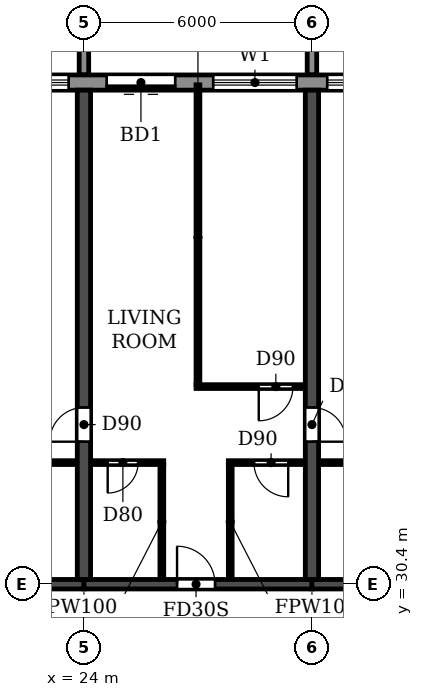
"""IFC4 building model, lengths in metres.
Left out: names, types, materials, properties, quantities, classifications, styles, units other than length and angle.
Written with IfcOpenShell. Run it as: python <this file> out.ifc"""

import sys

from ifc_helpers import new_model, si_unit, direction, frame, frame_2d, origin, place, context, subcontext, project, spatial, polyline, rectangle, outline, extrude, source, transform, mapped, element, fill, save


model = new_model("IFC4")
c1 = context("Model", 3, precision=1e-05, world=origin(), true_north=direction((0.0, 1.0)))
c2 = subcontext(c1, "Body", "Model", "MODEL_VIEW")
j1 = project(units=[si_unit("LENGTHUNIT", "METRE"), si_unit("PLANEANGLEUNIT", "RADIAN")], contexts=[c1])
p1 = place(None, origin())
s1 = spatial("IfcSite", under=j1, at=p1, CompositionType="ELEMENT")
p2 = place(p1, origin())
s2 = spatial("IfcBuilding", under=s1, at=p2, CompositionType="ELEMENT")
p3 = place(p2, frame((0.0, 0.0, 102.6)))
s3 = spatial("IfcBuildingStorey", under=s2, at=p3, CompositionType="ELEMENT", Elevation=102.6)
p4 = place(p3, frame((24.0, 30.525, 0.0), z_axis=(0.0, 0.0, 1.0), x_axis=(0.0, 1.0, 0.0)))
e1 = element("IfcWall", 1, at=p4, inside=s3, PredefinedType="SHEAR", context=c2, shape_type="SweptSolid", body=[
    extrude(rectangle(XDim=12.875, YDim=0.35, at=frame_2d((6.438, 0.0))), origin(), (0.0, 0.0, 1.0), 3.0),
])
p5 = place(p4, frame((3.625, 0.0, 0.0)))
e2 = element("IfcOpeningElement", 2, at=p5, cuts=e1, PredefinedType="OPENING", context=c2, shape_type="SweptSolid", body=[
    extrude(rectangle(XDim=0.9, YDim=2.1, at=frame_2d((0.45, 1.05))), frame((0.0, 0.185, 0.0), z_axis=(0.0, -1.0, 0.0), x_axis=(1.0, 0.0, 0.0)), (0.0, 0.0, 1.0), 0.37),
])
p6 = place(p3, frame((30.0, 30.525, 0.0), z_axis=(0.0, 0.0, 1.0), x_axis=(0.0, 1.0, 0.0)))
e3 = element("IfcWall", 3, at=p6, inside=s3, PredefinedType="SHEAR", context=c2, shape_type="SweptSolid", body=[
    extrude(rectangle(XDim=12.875, YDim=0.35, at=frame_2d((6.438, 0.0))), origin(), (0.0, 0.0, 1.0), 3.0),
])
p7 = place(p6, frame((3.625, 0.0, 0.0)))
e4 = element("IfcOpeningElement", 4, at=p7, cuts=e3, PredefinedType="OPENING", context=c2, shape_type="SweptSolid", body=[
    extrude(rectangle(XDim=0.9, YDim=2.1, at=frame_2d((0.45, 1.05))), frame((0.0, 0.185, 0.0), z_axis=(0.0, -1.0, 0.0), x_axis=(1.0, 0.0, 0.0)), (0.0, 0.0, 1.0), 0.37),
])
p8 = place(p3, frame((18.0, 30.4, 0.0), z_axis=(0.0, 0.0, 1.0), x_axis=(1.0, 0.0, 0.0)))
e5 = element("IfcWall", 5, at=p8, inside=s3, PredefinedType="SHEAR", context=c2, shape_type="SweptSolid", body=[
    extrude(rectangle(XDim=6.0, YDim=0.25, at=frame_2d((3.0, 0.0))), origin(), (0.0, 0.0, 1.0), 2.4),
])
p9 = place(p3, frame((24.0, 30.4, 0.0), z_axis=(0.0, 0.0, 1.0), x_axis=(1.0, 0.0, 0.0)))
e6 = element("IfcWall", 6, at=p9, inside=s3, PredefinedType="SHEAR", context=c2, shape_type="SweptSolid", body=[
    extrude(rectangle(XDim=6.0, YDim=0.25, at=frame_2d((3.0, 0.0))), origin(), (0.0, 0.0, 1.0), 2.4),
])
p10 = place(p9, frame((2.45, 0.0, 0.0)))
e7 = element("IfcOpeningElement", 7, at=p10, cuts=e6, PredefinedType="OPENING", context=c2, shape_type="SweptSolid", body=[
    extrude(rectangle(XDim=1.0, YDim=2.1, at=frame_2d((0.5, 1.05))), frame((0.0, 0.135, 0.0), z_axis=(0.0, -1.0, 0.0), x_axis=(1.0, 0.0, 0.0)), (0.0, 0.0, 1.0), 0.27),
])
p11 = place(p3, frame((30.0, 30.4, 0.0), z_axis=(0.0, 0.0, 1.0), x_axis=(1.0, 0.0, 0.0)))
e8 = element("IfcWall", 8, at=p11, inside=s3, PredefinedType="SHEAR", context=c2, shape_type="SweptSolid", body=[
    extrude(rectangle(XDim=6.0, YDim=0.25, at=frame_2d((3.0, 0.0))), origin(), (0.0, 0.0, 1.0), 2.4),
])
p12 = place(p3, frame((91.317, 43.6, 0.0), z_axis=(0.0, 0.0, 1.0), x_axis=(-1.0, 0.0, 0.0)))
e9 = element("IfcWall", 9, at=p12, inside=s3, PredefinedType="STANDARD", context=c2, shape_type="SweptSolid", body=[
    extrude(rectangle(XDim=80.634, YDim=0.4, at=frame_2d((40.317, 0.0))), origin(), (0.0, 0.0, 1.0), 3.0),
])
p13 = place(p12, frame((76.717, 0.0, 0.9)))
e10 = element("IfcOpeningElement", 10, at=p13, cuts=e9, PredefinedType="OPENING", context=c2, shape_type="SweptSolid", body=[
    extrude(rectangle(XDim=2.2, YDim=1.5, at=frame_2d((1.1, 0.75))), frame((0.0, 0.21, 0.0), z_axis=(0.0, -1.0, 0.0), x_axis=(1.0, 0.0, 0.0)), (0.0, 0.0, 1.0), 0.42),
])
p14 = place(p12, frame((73.917, 0.0, 0.0)))
e11 = element("IfcOpeningElement", 11, at=p14, cuts=e9, PredefinedType="OPENING", context=c2, shape_type="SweptSolid", body=[
    extrude(rectangle(XDim=1.8, YDim=2.4, at=frame_2d((0.9, 1.2))), frame((0.0, 0.21, 0.0), z_axis=(0.0, -1.0, 0.0), x_axis=(1.0, 0.0, 0.0)), (0.0, 0.0, 1.0), 0.42),
])
p15 = place(p12, frame((70.717, 0.0, 0.9)))
e12 = element("IfcOpeningElement", 12, at=p15, cuts=e9, PredefinedType="OPENING", context=c2, shape_type="SweptSolid", body=[
    extrude(rectangle(XDim=2.2, YDim=1.5, at=frame_2d((1.1, 0.75))), frame((0.0, 0.21, 0.0), z_axis=(0.0, -1.0, 0.0), x_axis=(1.0, 0.0, 0.0)), (0.0, 0.0, 1.0), 0.42),
])
p16 = place(p12, frame((67.717, 0.0, 0.9)))
e13 = element("IfcOpeningElement", 13, at=p16, cuts=e9, PredefinedType="OPENING", context=c2, shape_type="SweptSolid", body=[
    extrude(rectangle(XDim=2.2, YDim=1.5, at=frame_2d((1.1, 0.75))), frame((0.0, 0.21, 0.0), z_axis=(0.0, -1.0, 0.0), x_axis=(1.0, 0.0, 0.0)), (0.0, 0.0, 1.0), 0.42),
])
p17 = place(p12, frame((64.917, 0.0, 0.0)))
e14 = element("IfcOpeningElement", 14, at=p17, cuts=e9, PredefinedType="OPENING", context=c2, shape_type="SweptSolid", body=[
    extrude(rectangle(XDim=1.8, YDim=2.4, at=frame_2d((0.9, 1.2))), frame((0.0, 0.21, 0.0), z_axis=(0.0, -1.0, 0.0), x_axis=(1.0, 0.0, 0.0)), (0.0, 0.0, 1.0), 0.42),
])
p18 = place(p12, frame((61.717, 0.0, 0.9)))
e15 = element("IfcOpeningElement", 15, at=p18, cuts=e9, PredefinedType="OPENING", context=c2, shape_type="SweptSolid", body=[
    extrude(rectangle(XDim=2.2, YDim=1.5, at=frame_2d((1.1, 0.75))), frame((0.0, 0.21, 0.0), z_axis=(0.0, -1.0, 0.0), x_axis=(1.0, 0.0, 0.0)), (0.0, 0.0, 1.0), 0.42),
])
p19 = place(p12, frame((58.717, 0.0, 0.9)))
e16 = element("IfcOpeningElement", 16, at=p19, cuts=e9, PredefinedType="OPENING", context=c2, shape_type="SweptSolid", body=[
    extrude(rectangle(XDim=2.2, YDim=1.5, at=frame_2d((1.1, 0.75))), frame((0.0, 0.21, 0.0), z_axis=(0.0, -1.0, 0.0), x_axis=(1.0, 0.0, 0.0)), (0.0, 0.0, 1.0), 0.42),
])
p20 = place(p12, frame((55.717, 0.0, 0.9)))
e17 = element("IfcOpeningElement", 17, at=p20, cuts=e9, PredefinedType="OPENING", context=c2, shape_type="SweptSolid", body=[
    extrude(rectangle(XDim=2.2, YDim=1.5, at=frame_2d((1.1, 0.75))), frame((0.0, 0.21, 0.0), z_axis=(0.0, -1.0, 0.0), x_axis=(1.0, 0.0, 0.0)), (0.0, 0.0, 1.0), 0.42),
])
p21 = place(p12, frame((52.717, 0.0, 0.9)))
e18 = element("IfcOpeningElement", 18, at=p21, cuts=e9, PredefinedType="OPENING", context=c2, shape_type="SweptSolid", body=[
    extrude(rectangle(XDim=2.2, YDim=1.5, at=frame_2d((1.1, 0.75))), frame((0.0, 0.21, 0.0), z_axis=(0.0, -1.0, 0.0), x_axis=(1.0, 0.0, 0.0)), (0.0, 0.0, 1.0), 0.42),
])
p22 = place(p12, frame((49.917, 0.0, 0.0)))
e19 = element("IfcOpeningElement", 19, at=p22, cuts=e9, PredefinedType="OPENING", context=c2, shape_type="SweptSolid", body=[
    extrude(rectangle(XDim=1.8, YDim=2.4, at=frame_2d((0.9, 1.2))), frame((0.0, 0.21, 0.0), z_axis=(0.0, -1.0, 0.0), x_axis=(1.0, 0.0, 0.0)), (0.0, 0.0, 1.0), 0.42),
])
p23 = place(p12, frame((46.717, 0.0, 0.9)))
e20 = element("IfcOpeningElement", 20, at=p23, cuts=e9, PredefinedType="OPENING", context=c2, shape_type="SweptSolid", body=[
    extrude(rectangle(XDim=2.2, YDim=1.5, at=frame_2d((1.1, 0.75))), frame((0.0, 0.21, 0.0), z_axis=(0.0, -1.0, 0.0), x_axis=(1.0, 0.0, 0.0)), (0.0, 0.0, 1.0), 0.42),
])
p24 = place(p12, frame((43.917, 0.0, 0.0)))
e21 = element("IfcOpeningElement", 21, at=p24, cuts=e9, PredefinedType="OPENING", context=c2, shape_type="SweptSolid", body=[
    extrude(rectangle(XDim=1.8, YDim=2.4, at=frame_2d((0.9, 1.2))), frame((0.0, 0.21, 0.0), z_axis=(0.0, -1.0, 0.0), x_axis=(1.0, 0.0, 0.0)), (0.0, 0.0, 1.0), 0.42),
])
p25 = place(p12, frame((40.717, 0.0, 0.9)))
e22 = element("IfcOpeningElement", 22, at=p25, cuts=e9, PredefinedType="OPENING", context=c2, shape_type="SweptSolid", body=[
    extrude(rectangle(XDim=2.2, YDim=1.5, at=frame_2d((1.1, 0.75))), frame((0.0, 0.21, 0.0), z_axis=(0.0, -1.0, 0.0), x_axis=(1.0, 0.0, 0.0)), (0.0, 0.0, 1.0), 0.42),
])
p26 = place(p12, frame((37.717, 0.0, 0.9)))
e23 = element("IfcOpeningElement", 23, at=p26, cuts=e9, PredefinedType="OPENING", context=c2, shape_type="SweptSolid", body=[
    extrude(rectangle(XDim=2.2, YDim=1.5, at=frame_2d((1.1, 0.75))), frame((0.0, 0.21, 0.0), z_axis=(0.0, -1.0, 0.0), x_axis=(1.0, 0.0, 0.0)), (0.0, 0.0, 1.0), 0.42),
])
p27 = place(p12, frame((34.917, 0.0, 0.0)))
e24 = element("IfcOpeningElement", 24, at=p27, cuts=e9, PredefinedType="OPENING", context=c2, shape_type="SweptSolid", body=[
    extrude(rectangle(XDim=1.8, YDim=2.4, at=frame_2d((0.9, 1.2))), frame((0.0, 0.21, 0.0), z_axis=(0.0, -1.0, 0.0), x_axis=(1.0, 0.0, 0.0)), (0.0, 0.0, 1.0), 0.42),
])
p28 = place(p12, frame((31.717, 0.0, 0.9)))
e25 = element("IfcOpeningElement", 25, at=p28, cuts=e9, PredefinedType="OPENING", context=c2, shape_type="SweptSolid", body=[
    extrude(rectangle(XDim=2.2, YDim=1.5, at=frame_2d((1.1, 0.75))), frame((0.0, 0.21, 0.0), z_axis=(0.0, -1.0, 0.0), x_axis=(1.0, 0.0, 0.0)), (0.0, 0.0, 1.0), 0.42),
])
p29 = place(p12, frame((28.717, 0.0, 0.9)))
e26 = element("IfcOpeningElement", 26, at=p29, cuts=e9, PredefinedType="OPENING", context=c2, shape_type="SweptSolid", body=[
    extrude(rectangle(XDim=2.2, YDim=1.5, at=frame_2d((1.1, 0.75))), frame((0.0, 0.21, 0.0), z_axis=(0.0, -1.0, 0.0), x_axis=(1.0, 0.0, 0.0)), (0.0, 0.0, 1.0), 0.42),
])
p30 = place(p12, frame((25.917, 0.0, 0.0)))
e27 = element("IfcOpeningElement", 27, at=p30, cuts=e9, PredefinedType="OPENING", context=c2, shape_type="SweptSolid", body=[
    extrude(rectangle(XDim=1.8, YDim=2.4, at=frame_2d((0.9, 1.2))), frame((0.0, 0.21, 0.0), z_axis=(0.0, -1.0, 0.0), x_axis=(1.0, 0.0, 0.0)), (0.0, 0.0, 1.0), 0.42),
])
p31 = place(p12, frame((22.717, 0.0, 0.9)))
e28 = element("IfcOpeningElement", 28, at=p31, cuts=e9, PredefinedType="OPENING", context=c2, shape_type="SweptSolid", body=[
    extrude(rectangle(XDim=2.2, YDim=1.5, at=frame_2d((1.1, 0.75))), frame((0.0, 0.21, 0.0), z_axis=(0.0, -1.0, 0.0), x_axis=(1.0, 0.0, 0.0)), (0.0, 0.0, 1.0), 0.42),
])
p32 = place(p12, frame((19.717, 0.0, 0.9)))
e29 = element("IfcOpeningElement", 29, at=p32, cuts=e9, PredefinedType="OPENING", context=c2, shape_type="SweptSolid", body=[
    extrude(rectangle(XDim=2.2, YDim=1.5, at=frame_2d((1.1, 0.75))), frame((0.0, 0.21, 0.0), z_axis=(0.0, -1.0, 0.0), x_axis=(1.0, 0.0, 0.0)), (0.0, 0.0, 1.0), 0.42),
])
p33 = place(p12, frame((16.917, 0.0, 0.0)))
e30 = element("IfcOpeningElement", 30, at=p33, cuts=e9, PredefinedType="OPENING", context=c2, shape_type="SweptSolid", body=[
    extrude(rectangle(XDim=1.8, YDim=2.4, at=frame_2d((0.9, 1.2))), frame((0.0, 0.21, 0.0), z_axis=(0.0, -1.0, 0.0), x_axis=(1.0, 0.0, 0.0)), (0.0, 0.0, 1.0), 0.42),
])
p34 = place(p12, frame((13.717, 0.0, 0.9)))
e31 = element("IfcOpeningElement", 31, at=p34, cuts=e9, PredefinedType="OPENING", context=c2, shape_type="SweptSolid", body=[
    extrude(rectangle(XDim=2.2, YDim=1.5, at=frame_2d((1.1, 0.75))), frame((0.0, 0.21, 0.0), z_axis=(0.0, -1.0, 0.0), x_axis=(1.0, 0.0, 0.0)), (0.0, 0.0, 1.0), 0.42),
])
p35 = place(p12, frame((10.917, 0.0, 0.0)))
e32 = element("IfcOpeningElement", 32, at=p35, cuts=e9, PredefinedType="OPENING", context=c2, shape_type="SweptSolid", body=[
    extrude(rectangle(XDim=1.8, YDim=2.4, at=frame_2d((0.9, 1.2))), frame((0.0, 0.21, 0.0), z_axis=(0.0, -1.0, 0.0), x_axis=(1.0, 0.0, 0.0)), (0.0, 0.0, 1.0), 0.42),
])
p36 = place(p12, frame((7.717, 0.0, 0.9)))
e33 = element("IfcOpeningElement", 33, at=p36, cuts=e9, PredefinedType="OPENING", context=c2, shape_type="SweptSolid", body=[
    extrude(rectangle(XDim=2.2, YDim=1.5, at=frame_2d((1.1, 0.75))), frame((0.0, 0.21, 0.0), z_axis=(0.0, -1.0, 0.0), x_axis=(1.0, 0.0, 0.0)), (0.0, 0.0, 1.0), 0.42),
])
p37 = place(p12, frame((4.717, 0.0, 0.9)))
e34 = element("IfcOpeningElement", 34, at=p37, cuts=e9, PredefinedType="OPENING", context=c2, shape_type="SweptSolid", body=[
    extrude(rectangle(XDim=2.2, YDim=1.5, at=frame_2d((1.1, 0.75))), frame((0.0, 0.21, 0.0), z_axis=(0.0, -1.0, 0.0), x_axis=(1.0, 0.0, 0.0)), (0.0, 0.0, 1.0), 0.42),
])
p38 = place(p12, frame((1.917, 0.0, 0.0)))
e35 = element("IfcOpeningElement", 35, at=p38, cuts=e9, PredefinedType="OPENING", context=c2, shape_type="SweptSolid", body=[
    extrude(rectangle(XDim=1.8, YDim=2.4, at=frame_2d((0.9, 1.2))), frame((0.0, 0.21, 0.0), z_axis=(0.0, -1.0, 0.0), x_axis=(1.0, 0.0, 0.0)), (0.0, 0.0, 1.0), 0.42),
])
m1 = source(origin(), c2, "Body", "SweptSolid", [
    extrude(outline(polyline([(0.0, 0.0), (0.25, 0.0), (0.25, 3.1), (0.0, 3.1), (0.0, 0.0)])), origin(), (0.0, 0.0, 1.0), 3.1),
])
for number, where in (
    (36, (23.875, 43.8, 0.0)),
    (37, (29.875, 43.8, 0.0)),
):
    element("IfcWall", number, at=place(p3, frame(where)), inside=s3, PredefinedType="STANDARD", context=c2, shape_type="MappedRepresentation", body=[
        mapped(m1, transform((0.0, 0.0, 0.0))),
    ])
p39 = place(p3, frame((21.1, 33.6, 0.0), z_axis=(0.0, 0.0, 1.0), x_axis=(1.0, 0.0, 0.0)))
e38 = element("IfcWall", 38, at=p39, inside=s3, PredefinedType="PARTITIONING", context=c2, shape_type="SweptSolid", body=[
    extrude(rectangle(XDim=2.715, YDim=0.1, at=frame_2d((1.357, 0.0))), origin(), (0.0, 0.0, 1.0), 3.0),
])
p40 = place(p39, frame((1.0, 0.0, 0.0)))
e39 = element("IfcOpeningElement", 39, at=p40, cuts=e38, PredefinedType="OPENING", context=c2, shape_type="SweptSolid", body=[
    extrude(rectangle(XDim=0.8, YDim=2.1, at=frame_2d((0.4, 1.05))), frame((0.0, 0.06, 0.0), z_axis=(0.0, -1.0, 0.0), x_axis=(1.0, 0.0, 0.0)), (0.0, 0.0, 1.0), 0.12),
])
p41 = place(p3, frame((24.185, 33.6, 0.0), z_axis=(0.0, 0.0, 1.0), x_axis=(1.0, 0.0, 0.0)))
e40 = element("IfcWall", 40, at=p41, inside=s3, PredefinedType="PARTITIONING", context=c2, shape_type="SweptSolid", body=[
    extrude(rectangle(XDim=1.915, YDim=0.1, at=frame_2d((0.958, 0.0))), origin(), (0.0, 0.0, 1.0), 3.0),
])
p42 = place(p41, frame((0.44, 0.0, 0.0)))
e41 = element("IfcOpeningElement", 41, at=p42, cuts=e40, PredefinedType="OPENING", context=c2, shape_type="SweptSolid", body=[
    extrude(rectangle(XDim=0.8, YDim=2.1, at=frame_2d((0.4, 1.05))), frame((0.0, 0.06, 0.0), z_axis=(0.0, -1.0, 0.0), x_axis=(1.0, 0.0, 0.0)), (0.0, 0.0, 1.0), 0.12),
])
p43 = place(p3, frame((27.8, 33.6, 0.0), z_axis=(0.0, 0.0, 1.0), x_axis=(1.0, 0.0, 0.0)))
e42 = element("IfcWall", 42, at=p43, inside=s3, PredefinedType="PARTITIONING", context=c2, shape_type="SweptSolid", body=[
    extrude(rectangle(XDim=2.015, YDim=0.1, at=frame_2d((1.007, 0.0))), origin(), (0.0, 0.0, 1.0), 3.0),
])
p44 = place(p43, frame((0.675, 0.0, 0.0)))
e43 = element("IfcOpeningElement", 43, at=p44, cuts=e42, PredefinedType="OPENING", context=c2, shape_type="SweptSolid", body=[
    extrude(rectangle(XDim=0.9, YDim=2.1, at=frame_2d((0.45, 1.05))), frame((0.0, 0.06, 0.0), z_axis=(0.0, -1.0, 0.0), x_axis=(1.0, 0.0, 0.0)), (0.0, 0.0, 1.0), 0.12),
])
p45 = place(p3, frame((30.185, 33.6, 0.0), z_axis=(0.0, 0.0, 1.0), x_axis=(1.0, 0.0, 0.0)))
e44 = element("IfcWall", 44, at=p45, inside=s3, PredefinedType="PARTITIONING", context=c2, shape_type="SweptSolid", body=[
    extrude(rectangle(XDim=2.915, YDim=0.1, at=frame_2d((1.458, 0.0))), origin(), (0.0, 0.0, 1.0), 3.0),
])
p46 = place(p45, frame((0.915, 0.0, 0.0)))
e45 = element("IfcOpeningElement", 45, at=p46, cuts=e44, PredefinedType="OPENING", context=c2, shape_type="SweptSolid", body=[
    extrude(rectangle(XDim=0.8, YDim=2.1, at=frame_2d((0.4, 1.05))), frame((0.0, 0.06, 0.0), z_axis=(0.0, -1.0, 0.0), x_axis=(1.0, 0.0, 0.0)), (0.0, 0.0, 1.0), 0.12),
])
p47 = place(p3, frame((26.95, 35.6, 0.0), z_axis=(0.0, 0.0, 1.0), x_axis=(1.0, 0.0, 0.0)))
e46 = element("IfcWall", 46, at=p47, inside=s3, PredefinedType="PARTITIONING", context=c2, shape_type="SweptSolid", body=[
    extrude(rectangle(XDim=2.865, YDim=0.1, at=frame_2d((1.433, 0.0))), origin(), (0.0, 0.0, 1.0), 3.0),
])
p48 = place(p47, frame((1.65, 0.0, 0.0)))
e47 = element("IfcOpeningElement", 47, at=p48, cuts=e46, PredefinedType="OPENING", context=c2, shape_type="SweptSolid", body=[
    extrude(rectangle(XDim=0.9, YDim=2.1, at=frame_2d((0.45, 1.05))), frame((0.0, 0.06, 0.0), z_axis=(0.0, -1.0, 0.0), x_axis=(1.0, 0.0, 0.0)), (0.0, 0.0, 1.0), 0.12),
])
p49 = place(p3, frame((26.05, 30.535, 0.0), z_axis=(0.0, 0.0, 1.0), x_axis=(0.0, 1.0, 0.0)))
e48 = element("IfcWall", 48, at=p49, inside=s3, PredefinedType="PARTITIONING", context=c2, shape_type="SweptSolid", body=[
    extrude(rectangle(XDim=3.015, YDim=0.1, at=frame_2d((1.508, 0.0))), origin(), (0.0, 0.0, 1.0), 3.0),
])
p50 = place(p3, frame((27.0, 35.65, 0.0), z_axis=(0.0, 0.0, 1.0), x_axis=(0.0, 1.0, 0.0)))
e49 = element("IfcWall", 49, at=p50, inside=s3, PredefinedType="PARTITIONING", context=c2, shape_type="SweptSolid", body=[
    extrude(rectangle(XDim=7.89, YDim=0.1, at=frame_2d((3.945, 0.0))), origin(), (0.0, 0.0, 1.0), 3.0),
])
p51 = place(p3, frame((27.85, 30.535, 0.0), z_axis=(0.0, 0.0, 1.0), x_axis=(0.0, 1.0, 0.0)))
e50 = element("IfcWall", 50, at=p51, inside=s3, PredefinedType="PARTITIONING", context=c2, shape_type="SweptSolid", body=[
    extrude(rectangle(XDim=3.015, YDim=0.1, at=frame_2d((1.508, 0.0))), origin(), (0.0, 0.0, 1.0), 3.0),
])
p52 = place(p16, origin())
e51 = element("IfcWindow", 51, at=p52, inside=s3, PartitioningType="DOUBLE_PANEL_HORIZONTAL", PredefinedType="WINDOW", context=c2, shape_type="SweptSolid", body=[
    extrude(rectangle(XDim=2.2, YDim=1.5, at=frame_2d((1.1, 0.75))), frame((0.0, 0.03, 0.0), z_axis=(0.0, -1.0, 0.0), x_axis=(1.0, 0.0, 0.0)), (0.0, 0.0, 1.0), 0.06),
])
fill(e13, e51)
p53 = place(p17, origin())
e52 = element("IfcDoor", 52, at=p53, inside=s3, OperationType="DOUBLE_DOOR_SLIDING", PredefinedType="DOOR", context=c2, shape_type="SweptSolid", body=[
    extrude(rectangle(XDim=1.8, YDim=2.4, at=frame_2d((0.9, 1.2))), frame((0.0, 0.025, 0.0), z_axis=(0.0, -1.0, 0.0), x_axis=(1.0, 0.0, 0.0)), (0.0, 0.0, 1.0), 0.05),
])
fill(e14, e52)
p54 = place(p18, origin())
e53 = element("IfcWindow", 53, at=p54, inside=s3, PartitioningType="DOUBLE_PANEL_HORIZONTAL", PredefinedType="WINDOW", context=c2, shape_type="SweptSolid", body=[
    extrude(rectangle(XDim=2.2, YDim=1.5, at=frame_2d((1.1, 0.75))), frame((0.0, 0.03, 0.0), z_axis=(0.0, -1.0, 0.0), x_axis=(1.0, 0.0, 0.0)), (0.0, 0.0, 1.0), 0.06),
])
fill(e15, e53)
p55 = place(p19, origin())
e54 = element("IfcWindow", 54, at=p55, inside=s3, PartitioningType="DOUBLE_PANEL_HORIZONTAL", PredefinedType="WINDOW", context=c2, shape_type="SweptSolid", body=[
    extrude(rectangle(XDim=2.2, YDim=1.5, at=frame_2d((1.1, 0.75))), frame((0.0, 0.03, 0.0), z_axis=(0.0, -1.0, 0.0), x_axis=(1.0, 0.0, 0.0)), (0.0, 0.0, 1.0), 0.06),
])
fill(e16, e54)
p56 = place(p5, origin())
e55 = element("IfcDoor", 55, at=p56, inside=s3, OperationType="SINGLE_SWING_LEFT", PredefinedType="DOOR", context=c2, shape_type="SweptSolid", body=[
    extrude(rectangle(XDim=0.9, YDim=2.1, at=frame_2d((0.45, 1.05))), frame((0.0, 0.025, 0.0), z_axis=(0.0, -1.0, 0.0), x_axis=(1.0, 0.0, 0.0)), (0.0, 0.0, 1.0), 0.05),
])
fill(e2, e55)
p57 = place(p42, frame((0.8, 0.0, 0.0), z_axis=(0.0, 0.0, 1.0), x_axis=(-1.0, 0.0, 0.0)))
e56 = element("IfcDoor", 56, at=p57, inside=s3, OperationType="SINGLE_SWING_RIGHT", PredefinedType="DOOR", context=c2, shape_type="SweptSolid", body=[
    extrude(rectangle(XDim=0.8, YDim=2.1, at=frame_2d((0.4, 1.05))), frame((0.0, 0.025, 0.0), z_axis=(0.0, -1.0, 0.0), x_axis=(1.0, 0.0, 0.0)), (0.0, 0.0, 1.0), 0.05),
])
fill(e41, e56)
p58 = place(p10, origin())
e57 = element("IfcDoor", 57, at=p58, inside=s3, OperationType="SINGLE_SWING_LEFT", PredefinedType="DOOR", context=c2, shape_type="SweptSolid", body=[
    extrude(rectangle(XDim=1.0, YDim=2.1, at=frame_2d((0.5, 1.05))), frame((0.0, 0.025, 0.0), z_axis=(0.0, -1.0, 0.0), x_axis=(1.0, 0.0, 0.0)), (0.0, 0.0, 1.0), 0.05),
])
fill(e7, e57)
p59 = place(p44, frame((0.9, 0.0, 0.0), z_axis=(0.0, 0.0, 1.0), x_axis=(-1.0, 0.0, 0.0)))
e58 = element("IfcDoor", 58, at=p59, inside=s3, OperationType="SINGLE_SWING_LEFT", PredefinedType="DOOR", context=c2, shape_type="SweptSolid", body=[
    extrude(rectangle(XDim=0.9, YDim=2.1, at=frame_2d((0.45, 1.05))), frame((0.0, 0.025, 0.0), z_axis=(0.0, -1.0, 0.0), x_axis=(1.0, 0.0, 0.0)), (0.0, 0.0, 1.0), 0.05),
])
fill(e43, e58)
p60 = place(p48, frame((0.9, 0.0, 0.0), z_axis=(0.0, 0.0, 1.0), x_axis=(-1.0, 0.0, 0.0)))
e59 = element("IfcDoor", 59, at=p60, inside=s3, OperationType="SINGLE_SWING_RIGHT", PredefinedType="DOOR", context=c2, shape_type="SweptSolid", body=[
    extrude(rectangle(XDim=0.9, YDim=2.1, at=frame_2d((0.45, 1.05))), frame((0.0, 0.025, 0.0), z_axis=(0.0, -1.0, 0.0), x_axis=(1.0, 0.0, 0.0)), (0.0, 0.0, 1.0), 0.05),
])
fill(e47, e59)
p61 = place(p7, frame((0.9, 0.0, 0.0), z_axis=(0.0, 0.0, 1.0), x_axis=(-1.0, 0.0, 0.0)))
e60 = element("IfcDoor", 60, at=p61, inside=s3, OperationType="SINGLE_SWING_RIGHT", PredefinedType="DOOR", context=c2, shape_type="SweptSolid", body=[
    extrude(rectangle(XDim=0.9, YDim=2.1, at=frame_2d((0.45, 1.05))), frame((0.0, 0.025, 0.0), z_axis=(0.0, -1.0, 0.0), x_axis=(1.0, 0.0, 0.0)), (0.0, 0.0, 1.0), 0.05),
])
fill(e4, e60)
save(model, sys.argv[1])
